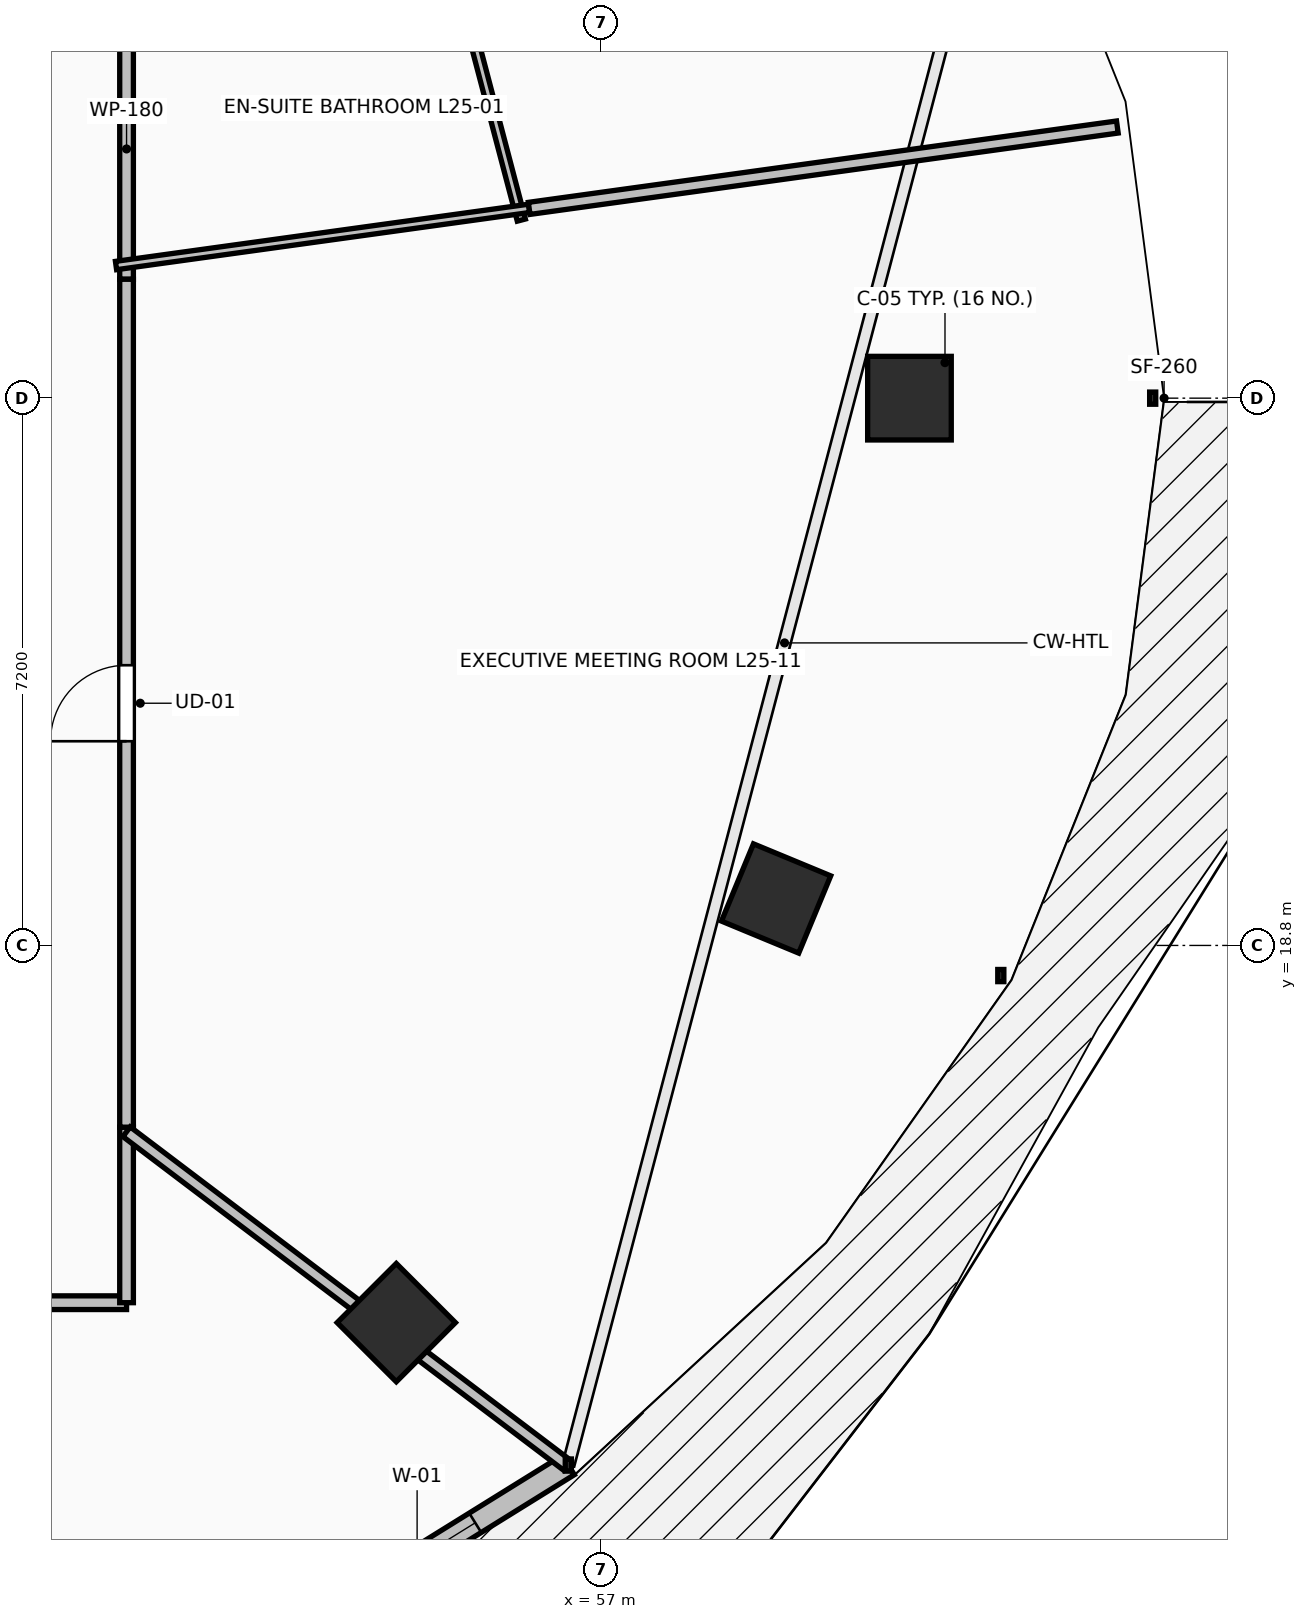
"""IFC4 building model, lengths in metres.
Left out: names, types, materials, properties, quantities, classifications, styles, units other than length and angle.
Written with IfcOpenShell. Run it as: python <this file> out.ifc"""

import sys

from ifc_helpers import new_model, si_unit, direction, frame, frame_2d, origin, origin_2d, place, context, subcontext, project, spatial, rectangle, extrude, element, fill, save


model = new_model("IFC4")
c1 = context("Model", 3, precision=1e-05, world=origin(), true_north=direction((0.0, 1.0)))
c2 = subcontext(c1, "Body", "Model", "MODEL_VIEW")
j1 = project(units=[si_unit("LENGTHUNIT", "METRE"), si_unit("PLANEANGLEUNIT", "RADIAN")], contexts=[c1])
p1 = place(None, origin())
s1 = spatial("IfcSite", under=j1, at=p1, CompositionType="ELEMENT")
p2 = place(p1, origin())
s2 = spatial("IfcBuilding", under=s1, at=p2, CompositionType="ELEMENT")
p3 = place(p2, frame((0.0, 0.0, 96.3)))
s3 = spatial("IfcBuildingStorey", under=s2, at=p3, CompositionType="ELEMENT", Elevation=96.3)
for number, where, z_axis, x_axis in (
    (1, (61.05, 26.0, 0.0), (0.0, 0.0, 1.0), (1.0, 0.0, 0.0)),
    (2, (54.299, 13.838, 0.0), (0.0, 0.0, 1.0), (0.707, -0.707, 0.0)),
    (3, (59.295, 19.418, 0.0), (0.0, 0.0, 1.0), (0.924, -0.383, 0.0)),
):
    element("IfcColumn", number, at=place(p3, frame(where, z_axis=z_axis, x_axis=x_axis)), inside=s3, PredefinedType="COLUMN", context=c2, shape_type="SweptSolid", body=[
        extrude(rectangle(XDim=1.1, YDim=1.1, at=origin_2d()), origin(), (0.0, 0.0, 1.0), 3.5),
    ])
p4 = place(p3, frame((52.584, 9.495, 0.0), z_axis=(0.0, 0.0, 1.0), x_axis=(0.849684479743, 0.527291461038, 0.0)))
e4 = element("IfcWall", 4, at=p4, inside=s3, PredefinedType="STANDARD", context=c2, shape_type="SweptSolid", body=[
    extrude(rectangle(XDim=4.681, YDim=0.3, at=frame_2d((2.341, 0.0))), origin(), (0.0, 0.0, 1.0), 3.24),
])
p5 = place(p4, frame((1.441, 0.0, 0.85)))
e5 = element("IfcOpeningElement", 5, at=p5, cuts=e4, PredefinedType="OPENING", context=c2, shape_type="SweptSolid", body=[
    extrude(rectangle(XDim=1.8, YDim=2.19, at=frame_2d((0.9, 1.095))), frame((0.0, 0.165, 0.0), z_axis=(0.0, -1.0, 0.0), x_axis=(1.0, 0.0, 0.0)), (0.0, 0.0, 1.0), 0.33),
])
p6 = place(p3, frame((50.75, 27.564, 0.0), z_axis=(0.0, 0.0, 1.0), x_axis=(0.0, 1.0, 0.0)))
e6 = element("IfcWall", 6, at=p6, inside=s3, PredefinedType="PARTITIONING", context=c2, shape_type="SweptSolid", body=[
    extrude(rectangle(XDim=3.429, YDim=0.18, at=frame_2d((1.714, 0.0))), origin(), (0.0, 0.0, 1.0), 2.432),
])
p7 = place(p3, frame((44.181, 14.1, 0.0), z_axis=(0.0, 0.0, 1.0), x_axis=(1.0, 0.0, 0.0)))
e7 = element("IfcWall", 7, at=p7, inside=s3, PredefinedType="PARTITIONING", context=c2, shape_type="SweptSolid", body=[
    extrude(rectangle(XDim=6.569, YDim=0.18, at=frame_2d((3.285, 0.0))), origin(), (0.0, 0.0, 1.0), 2.432),
])
p8 = place(p7, frame((2.76, 0.0, 0.0)))
e8 = element("IfcOpeningElement", 8, at=p8, cuts=e7, PredefinedType="OPENING", context=c2, shape_type="SweptSolid", body=[
    extrude(rectangle(XDim=1.05, YDim=2.2, at=frame_2d((0.525, 1.1))), frame((0.0, 0.105, 0.0), z_axis=(0.0, -1.0, 0.0), x_axis=(1.0, 0.0, 0.0)), (0.0, 0.0, 1.0), 0.21),
])
p9 = place(p3, frame((50.75, 14.1, 0.0), z_axis=(0.0, 0.0, 1.0), x_axis=(0.0, 1.0, 0.0)))
e9 = element("IfcWall", 9, at=p9, inside=s3, PredefinedType="PARTITIONING", context=c2, shape_type="SweptSolid", body=[
    extrude(rectangle(XDim=2.309, YDim=0.18, at=frame_2d((1.154, 0.0))), origin(), (0.0, 0.0, 1.0), 2.432),
])
p10 = place(p3, frame((50.75, 16.409, 0.0), z_axis=(0.0, 0.0, 1.0), x_axis=(0.0, 1.0, 0.0)))
e10 = element("IfcWall", 10, at=p10, inside=s3, PredefinedType="PARTITIONING", context=c2, shape_type="SweptSolid", body=[
    extrude(rectangle(XDim=11.155, YDim=0.18, at=frame_2d((5.578, 0.0))), origin(), (0.0, 0.0, 1.0), 2.432),
])
p11 = place(p10, frame((5.077, 0.0, 0.0)))
e11 = element("IfcOpeningElement", 11, at=p11, cuts=e10, PredefinedType="OPENING", context=c2, shape_type="SweptSolid", body=[
    extrude(rectangle(XDim=1.0, YDim=2.15, at=frame_2d((0.5, 1.075))), frame((0.0, 0.105, 0.0), z_axis=(0.0, -1.0, 0.0), x_axis=(1.0, 0.0, 0.0)), (0.0, 0.0, 1.0), 0.21),
])
p12 = place(p3, frame((55.111, 31.506, 0.0), z_axis=(0.0, 0.0, 1.0), x_axis=(0.254405137241, -0.967097733502, 0.0)))
e12 = element("IfcWall", 12, at=p12, inside=s3, PredefinedType="PARTITIONING", context=c2, shape_type="SweptSolid", body=[
    extrude(rectangle(XDim=3.271, YDim=0.11, at=frame_2d((1.636, 0.0))), origin(), (0.0, 0.0, 1.0), 2.922),
])
p13 = place(p3, frame((56.047, 28.497, 0.0), z_axis=(0.0, 0.0, 1.0), x_axis=(-0.990553307294, -0.137128207927, 0.0)))
e13 = element("IfcWall", 13, at=p13, inside=s3, PredefinedType="PARTITIONING", context=c2, shape_type="SweptSolid", body=[
    extrude(rectangle(XDim=5.487, YDim=0.11, at=frame_2d((2.744, 0.0))), origin(), (0.0, 0.0, 1.0), 2.432),
])
p14 = place(p3, frame((56.047, 28.497, 0.0), z_axis=(0.0, 0.0, 1.0), x_axis=(0.990569127114, 0.137013883997, 0.0)))
e14 = element("IfcWall", 14, at=p14, inside=s3, PredefinedType="PARTITIONING", context=c2, shape_type="SweptSolid", body=[
    extrude(rectangle(XDim=7.812, YDim=0.16, at=frame_2d((3.906, 0.0))), origin(), (0.0, 0.0, 1.0), 2.677),
])
p15 = place(p3, frame((56.548, 11.96, 0.0), z_axis=(0.0, 0.0, 1.0), x_axis=(-0.797312940684, 0.603566131105, 0.0)))
e15 = element("IfcWall", 15, at=p15, inside=s3, PredefinedType="PARTITIONING", context=c2, shape_type="SweptSolid", body=[
    extrude(rectangle(XDim=7.272, YDim=0.16, at=frame_2d((3.636, 0.0))), origin(), (0.0, 0.0, 1.0), 2.432),
])
p16 = place(p5, origin())
e16 = element("IfcWindow", 16, at=p16, inside=s3, PartitioningType="SINGLE_PANEL", PredefinedType="WINDOW", context=c2, shape_type="SweptSolid", body=[
    extrude(rectangle(XDim=1.8, YDim=2.19, at=frame_2d((0.9, 1.095))), frame((0.0, 0.03, 0.0), z_axis=(0.0, -1.0, 0.0), x_axis=(1.0, 0.0, 0.0)), (0.0, 0.0, 1.0), 0.06),
])
fill(e5, e16)
p17 = place(p11, origin())
e17 = element("IfcDoor", 17, at=p17, inside=s3, OperationType="SINGLE_SWING_LEFT", PredefinedType="DOOR", context=c2, shape_type="SweptSolid", body=[
    extrude(rectangle(XDim=1.0, YDim=2.15, at=frame_2d((0.5, 1.075))), frame((0.0, 0.025, 0.0), z_axis=(0.0, -1.0, 0.0), x_axis=(1.0, 0.0, 0.0)), (0.0, 0.0, 1.0), 0.05),
])
fill(e11, e17)
save(model, sys.argv[1])
